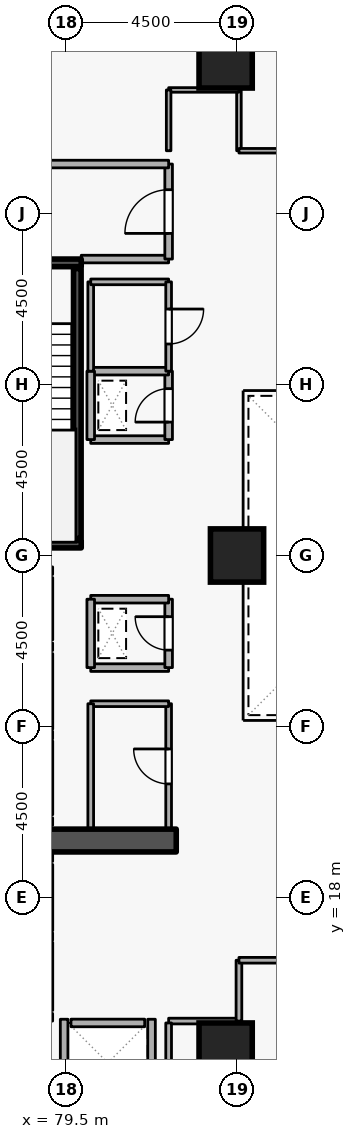
"""IFC4 building model, lengths in metres.
Left out: names, types, materials, properties, quantities, classifications, styles, units other than length and angle.
Written with IfcOpenShell. Run it as: python <this file> out.ifc"""

import sys

from ifc_helpers import new_model, si_unit, direction, frame, frame_2d, origin, origin_2d, place, context, subcontext, project, spatial, rectangle, extrude, element, fill, save


model = new_model("IFC4")
c1 = context("Model", 3, precision=1e-05, world=origin(), true_north=direction((0.0, 1.0)))
c2 = subcontext(c1, "Body", "Model", "MODEL_VIEW")
j1 = project(units=[si_unit("LENGTHUNIT", "METRE"), si_unit("PLANEANGLEUNIT", "RADIAN")], contexts=[c1])
p1 = place(None, origin())
s1 = spatial("IfcSite", under=j1, at=p1, CompositionType="ELEMENT")
p2 = place(p1, origin())
s2 = spatial("IfcBuilding", under=s1, at=p2, CompositionType="ELEMENT")
p3 = place(p2, frame((0.0, 0.0, 27.9)))
s3 = spatial("IfcBuildingStorey", under=s2, at=p3, CompositionType="ELEMENT", Elevation=27.9)
p4 = place(p3, frame((76.7, 19.5, 0.0), z_axis=(0.0, 0.0, 1.0), x_axis=(1.0, 0.0, 0.0)))
e1 = element("IfcWall", 1, at=p4, inside=s3, PredefinedType="SHEAR", context=c2, shape_type="SweptSolid", body=[
    extrude(rectangle(XDim=5.7, YDim=0.6, at=frame_2d((2.85, 0.0))), origin(), (0.0, 0.0, 1.0), 3.6),
])
for number, where, z_axis, x_axis in (
    (2, (83.7, 14.0, 0.0), (0.0, 0.0, 1.0), (1.0, 0.0, 0.0)),
    (3, (83.7, 40.0, 0.0), (0.0, 0.0, 1.0), (1.0, 0.0, 0.0)),
    (4, (84.0, 27.0, 0.0), (0.0, 0.0, 1.0), (1.0, 0.0, 0.0)),
):
    element("IfcColumn", number, at=place(p3, frame(where, z_axis=z_axis, x_axis=x_axis)), inside=s3, PredefinedType="COLUMN", context=c2, shape_type="SweptSolid", body=[
        extrude(rectangle(XDim=1.4, YDim=1.4, at=origin_2d()), origin(), (0.0, 0.0, 1.0), 3.6),
    ])
p5 = place(p3, frame((79.05, 24.78, 0.0), z_axis=(0.0, 0.0, 1.0), x_axis=(0.0, 1.0, 0.0)))
e5 = element("IfcWall", 5, at=p5, inside=s3, PredefinedType="STANDARD", context=c2, shape_type="SweptSolid", body=[
    extrude(rectangle(XDim=1.64, YDim=0.2, at=frame_2d((0.82, 0.0))), origin(), (0.0, 0.0, 1.0), 3.34),
])
p6 = place(p5, frame((0.31, 0.0, 0.0)))
e6 = element("IfcOpeningElement", 6, at=p6, cuts=e5, PredefinedType="OPENING", context=c2, shape_type="SweptSolid", body=[
    extrude(rectangle(XDim=1.02, YDim=2.06, at=frame_2d((0.51, 1.03))), frame((0.0, 0.11, 0.0), z_axis=(0.0, -1.0, 0.0), x_axis=(1.0, 0.0, 0.0)), (0.0, 0.0, 1.0), 0.22),
])
p7 = place(p3, frame((79.05, 22.43, 0.0), z_axis=(0.0, 0.0, 1.0), x_axis=(0.0, 1.0, 0.0)))
e7 = element("IfcWall", 7, at=p7, inside=s3, PredefinedType="STANDARD", context=c2, shape_type="SweptSolid", body=[
    extrude(rectangle(XDim=1.99, YDim=0.2, at=frame_2d((0.995, 0.0))), origin(), (0.0, 0.0, 1.0), 3.34),
])
p8 = place(p3, frame((79.05, 20.18, 0.0), z_axis=(0.0, 0.0, 1.0), x_axis=(0.0, 1.0, 0.0)))
e8 = element("IfcWall", 8, at=p8, inside=s3, PredefinedType="STANDARD", context=c2, shape_type="SweptSolid", body=[
    extrude(rectangle(XDim=1.94, YDim=0.2, at=frame_2d((0.97, 0.0))), origin(), (0.0, 0.0, 1.0), 3.34),
])
p9 = place(p3, frame((79.05, 17.13, 0.0), z_axis=(0.0, 0.0, 1.0), x_axis=(0.0, 1.0, 0.0)))
e9 = element("IfcWall", 9, at=p9, inside=s3, PredefinedType="STANDARD", context=c2, shape_type="SweptSolid", body=[
    extrude(rectangle(XDim=1.74, YDim=0.2, at=frame_2d((0.87, 0.0))), origin(), (0.0, 0.0, 1.0), 3.34),
])
p10 = place(p3, frame((79.05, 15.03, 0.0), z_axis=(0.0, 0.0, 1.0), x_axis=(0.0, 1.0, 0.0)))
e10 = element("IfcWall", 10, at=p10, inside=s3, PredefinedType="STANDARD", context=c2, shape_type="SweptSolid", body=[
    extrude(rectangle(XDim=1.79, YDim=0.2, at=frame_2d((0.895, 0.0))), origin(), (0.0, 0.0, 1.0), 3.34),
])
p11 = place(p3, frame((79.63, 14.7, 0.0), z_axis=(0.0, 0.0, 1.0), x_axis=(1.0, 0.0, 0.0)))
e11 = element("IfcWall", 11, at=p11, inside=s3, PredefinedType="STANDARD", context=c2, shape_type="SweptSolid", body=[
    extrude(rectangle(XDim=1.94, YDim=0.2, at=frame_2d((0.97, 0.0))), origin(), (0.0, 0.0, 1.0), 3.34),
])
for number, where, z_axis, x_axis in (
    (12, (81.75, 12.612, 0.0), (0.0, 0.0, 1.0), (0.0, 1.0, 0.0)),
    (13, (79.45, 12.612, 0.0), (0.0, 0.0, 1.0), (0.0, 1.0, 0.0)),
):
    element("IfcWall", number, at=place(p3, frame(where, z_axis=z_axis, x_axis=x_axis)), inside=s3, PredefinedType="STANDARD", context=c2, shape_type="SweptSolid", body=[
        extrude(rectangle(XDim=2.186, YDim=0.2, at=frame_2d((1.093, 0.0))), origin(), (0.0, 0.0, 1.0), 3.34),
    ])
p12 = place(p3, frame((76.55, 34.7, 0.0), z_axis=(0.0, 0.0, 1.0), x_axis=(1.0, 0.0, 0.0)))
e14 = element("IfcWall", 14, at=p12, inside=s3, PredefinedType="SHEAR", context=c2, shape_type="SweptSolid", body=[
    extrude(rectangle(XDim=3.35, YDim=0.2, at=frame_2d((1.675, 0.0))), origin(), (0.0, 0.0, 1.0), 3.6),
])
p13 = place(p12, frame((1.125, 0.0, 0.0)))
e15 = element("IfcOpeningElement", 15, at=p13, cuts=e14, PredefinedType="OPENING", context=c2, shape_type="SweptSolid", body=[
    extrude(rectangle(XDim=1.1, YDim=2.1, at=frame_2d((0.55, 1.05))), frame((0.0, 0.11, 0.0), z_axis=(0.0, -1.0, 0.0), x_axis=(1.0, 0.0, 0.0)), (0.0, 0.0, 1.0), 0.22),
])
p14 = place(p3, frame((79.9, 27.3, 0.0), z_axis=(0.0, 0.0, 1.0), x_axis=(-1.0, 0.0, 0.0)))
e16 = element("IfcWall", 16, at=p14, inside=s3, PredefinedType="SHEAR", context=c2, shape_type="SweptSolid", body=[
    extrude(rectangle(XDim=3.35, YDim=0.2, at=frame_2d((1.675, 0.0))), origin(), (0.0, 0.0, 1.0), 3.6),
])
p15 = place(p3, frame((79.797, 27.45, 0.0), z_axis=(0.0, 0.0, 1.0), x_axis=(0.0, 1.0, 0.0)))
e17 = element("IfcWall", 17, at=p15, inside=s3, PredefinedType="SHEAR", context=c2, shape_type="SweptSolid", body=[
    extrude(rectangle(XDim=7.1, YDim=0.2, at=frame_2d((3.55, 0.0))), origin(), (0.0, 0.0, 1.0), 3.6),
])
p16 = place(p3, frame((79.9, 34.8, 0.0), z_axis=(0.0, 0.0, 1.0), x_axis=(1.0, 0.0, 0.0)))
e18 = element("IfcWall", 18, at=p16, inside=s3, PredefinedType="STANDARD", context=c2, shape_type="SweptSolid", body=[
    extrude(rectangle(XDim=2.3, YDim=0.2, at=frame_2d((1.15, 0.0))), origin(), (0.0, 0.0, 1.0), 2.545),
])
p17 = place(p3, frame((82.2, 34.8, 0.0), z_axis=(0.0, 0.0, 1.0), x_axis=(0.0, 1.0, 0.0)))
e19 = element("IfcWall", 19, at=p17, inside=s3, PredefinedType="STANDARD", context=c2, shape_type="SweptSolid", body=[
    extrude(rectangle(XDim=2.5, YDim=0.2, at=frame_2d((1.25, 0.0))), origin(), (0.0, 0.0, 1.0), 3.34),
])
p18 = place(p17, frame((0.675, 0.0, 0.0)))
e20 = element("IfcOpeningElement", 20, at=p18, cuts=e19, PredefinedType="OPENING", context=c2, shape_type="SweptSolid", body=[
    extrude(rectangle(XDim=1.15, YDim=2.1, at=frame_2d((0.575, 1.05))), frame((0.0, 0.11, 0.0), z_axis=(0.0, -1.0, 0.0), x_axis=(1.0, 0.0, 0.0)), (0.0, 0.0, 1.0), 0.22),
])
p19 = place(p3, frame((82.2, 37.3, 0.0), z_axis=(0.0, 0.0, 1.0), x_axis=(-1.0, 0.0, 0.0)))
e21 = element("IfcWall", 21, at=p19, inside=s3, PredefinedType="STANDARD", context=c2, shape_type="SweptSolid", body=[
    extrude(rectangle(XDim=5.7, YDim=0.2, at=frame_2d((2.85, 0.0))), origin(), (0.0, 0.0, 1.0), 3.34),
])
p20 = place(p3, frame((80.15, 24.05, 0.0), z_axis=(0.0, 0.0, 1.0), x_axis=(1.0, 0.0, 0.0)))
e22 = element("IfcWall", 22, at=p20, inside=s3, PredefinedType="STANDARD", context=c2, shape_type="SweptSolid", body=[
    extrude(rectangle(XDim=2.05, YDim=0.2, at=frame_2d((1.025, 0.0))), origin(), (0.0, 0.0, 1.0), 3.34),
])
p21 = place(p3, frame((82.2, 24.05, 0.0), z_axis=(0.0, 0.0, 1.0), x_axis=(0.0, 1.0, 0.0)))
e23 = element("IfcWall", 23, at=p21, inside=s3, PredefinedType="STANDARD", context=c2, shape_type="SweptSolid", body=[
    extrude(rectangle(XDim=1.8, YDim=0.2, at=frame_2d((0.9, 0.0))), origin(), (0.0, 0.0, 1.0), 3.34),
])
p22 = place(p21, frame((0.46, 0.0, 0.0)))
e24 = element("IfcOpeningElement", 24, at=p22, cuts=e23, PredefinedType="OPENING", context=c2, shape_type="SweptSolid", body=[
    extrude(rectangle(XDim=0.88, YDim=2.04, at=frame_2d((0.44, 1.02))), frame((0.0, 0.11, 0.0), z_axis=(0.0, -1.0, 0.0), x_axis=(1.0, 0.0, 0.0)), (0.0, 0.0, 1.0), 0.22),
])
p23 = place(p3, frame((82.2, 25.85, 0.0), z_axis=(0.0, 0.0, 1.0), x_axis=(-1.0, 0.0, 0.0)))
e25 = element("IfcWall", 25, at=p23, inside=s3, PredefinedType="STANDARD", context=c2, shape_type="SweptSolid", body=[
    extrude(rectangle(XDim=2.05, YDim=0.2, at=frame_2d((1.025, 0.0))), origin(), (0.0, 0.0, 1.0), 3.34),
])
p24 = place(p3, frame((80.15, 25.85, 0.0), z_axis=(0.0, 0.0, 1.0), x_axis=(0.0, -1.0, 0.0)))
e26 = element("IfcWall", 26, at=p24, inside=s3, PredefinedType="STANDARD", context=c2, shape_type="SweptSolid", body=[
    extrude(rectangle(XDim=1.8, YDim=0.2, at=frame_2d((0.9, 0.0))), origin(), (0.0, 0.0, 1.0), 3.34),
])
p25 = place(p3, frame((80.15, 30.05, 0.0), z_axis=(0.0, 0.0, 1.0), x_axis=(1.0, 0.0, 0.0)))
e27 = element("IfcWall", 27, at=p25, inside=s3, PredefinedType="STANDARD", context=c2, shape_type="SweptSolid", body=[
    extrude(rectangle(XDim=2.05, YDim=0.2, at=frame_2d((1.025, 0.0))), origin(), (0.0, 0.0, 1.0), 3.34),
])
p26 = place(p3, frame((82.2, 30.05, 0.0), z_axis=(0.0, 0.0, 1.0), x_axis=(0.0, 1.0, 0.0)))
e28 = element("IfcWall", 28, at=p26, inside=s3, PredefinedType="STANDARD", context=c2, shape_type="SweptSolid", body=[
    extrude(rectangle(XDim=1.8, YDim=0.2, at=frame_2d((0.9, 0.0))), origin(), (0.0, 0.0, 1.0), 3.34),
])
p27 = place(p26, frame((0.46, 0.0, 0.0)))
e29 = element("IfcOpeningElement", 29, at=p27, cuts=e28, PredefinedType="OPENING", context=c2, shape_type="SweptSolid", body=[
    extrude(rectangle(XDim=0.88, YDim=2.04, at=frame_2d((0.44, 1.02))), frame((0.0, 0.11, 0.0), z_axis=(0.0, -1.0, 0.0), x_axis=(1.0, 0.0, 0.0)), (0.0, 0.0, 1.0), 0.22),
])
p28 = place(p3, frame((82.2, 31.85, 0.0), z_axis=(0.0, 0.0, 1.0), x_axis=(-1.0, 0.0, 0.0)))
e30 = element("IfcWall", 30, at=p28, inside=s3, PredefinedType="STANDARD", context=c2, shape_type="SweptSolid", body=[
    extrude(rectangle(XDim=2.05, YDim=0.2, at=frame_2d((1.025, 0.0))), origin(), (0.0, 0.0, 1.0), 3.34),
])
p29 = place(p3, frame((80.15, 31.85, 0.0), z_axis=(0.0, 0.0, 1.0), x_axis=(0.0, -1.0, 0.0)))
e31 = element("IfcWall", 31, at=p29, inside=s3, PredefinedType="STANDARD", context=c2, shape_type="SweptSolid", body=[
    extrude(rectangle(XDim=1.8, YDim=0.2, at=frame_2d((0.9, 0.0))), origin(), (0.0, 0.0, 1.0), 3.34),
])
p30 = place(p3, frame((82.2, 19.8, 0.0), z_axis=(0.0, 0.0, 1.0), x_axis=(0.0, 1.0, 0.0)))
e32 = element("IfcWall", 32, at=p30, inside=s3, PredefinedType="PARTITIONING", context=c2, shape_type="SweptSolid", body=[
    extrude(rectangle(XDim=3.3, YDim=0.15, at=frame_2d((1.65, 0.0))), origin(), (0.0, 0.0, 1.0), 3.34),
])
p31 = place(p30, frame((1.19, 0.0, 0.0)))
e33 = element("IfcOpeningElement", 33, at=p31, cuts=e32, PredefinedType="OPENING", context=c2, shape_type="SweptSolid", body=[
    extrude(rectangle(XDim=0.92, YDim=2.08, at=frame_2d((0.46, 1.04))), frame((0.0, 0.085, 0.0), z_axis=(0.0, -1.0, 0.0), x_axis=(1.0, 0.0, 0.0)), (0.0, 0.0, 1.0), 0.17),
])
p32 = place(p3, frame((82.2, 23.1, 0.0), z_axis=(0.0, 0.0, 1.0), x_axis=(-1.0, 0.0, 0.0)))
e34 = element("IfcWall", 34, at=p32, inside=s3, PredefinedType="PARTITIONING", context=c2, shape_type="SweptSolid", body=[
    extrude(rectangle(XDim=2.05, YDim=0.15, at=frame_2d((1.025, 0.0))), origin(), (0.0, 0.0, 1.0), 3.34),
])
p33 = place(p3, frame((80.15, 23.1, 0.0), z_axis=(0.0, 0.0, 1.0), x_axis=(0.0, -1.0, 0.0)))
e35 = element("IfcWall", 35, at=p33, inside=s3, PredefinedType="PARTITIONING", context=c2, shape_type="SweptSolid", body=[
    extrude(rectangle(XDim=3.3, YDim=0.15, at=frame_2d((1.65, 0.0))), origin(), (0.0, 0.0, 1.0), 3.34),
])
p34 = place(p3, frame((80.15, 31.85, 0.0), z_axis=(0.0, 0.0, 1.0), x_axis=(0.0, 1.0, 0.0)))
e36 = element("IfcWall", 36, at=p34, inside=s3, PredefinedType="PARTITIONING", context=c2, shape_type="SweptSolid", body=[
    extrude(rectangle(XDim=2.35, YDim=0.15, at=frame_2d((1.175, 0.0))), origin(), (0.0, 0.0, 1.0), 3.34),
])
p35 = place(p3, frame((80.15, 34.2, 0.0), z_axis=(0.0, 0.0, 1.0), x_axis=(1.0, 0.0, 0.0)))
e37 = element("IfcWall", 37, at=p35, inside=s3, PredefinedType="PARTITIONING", context=c2, shape_type="SweptSolid", body=[
    extrude(rectangle(XDim=2.05, YDim=0.15, at=frame_2d((1.025, 0.0))), origin(), (0.0, 0.0, 1.0), 2.545),
])
p36 = place(p3, frame((82.2, 34.2, 0.0), z_axis=(0.0, 0.0, 1.0), x_axis=(0.0, -1.0, 0.0)))
e38 = element("IfcWall", 38, at=p36, inside=s3, PredefinedType="PARTITIONING", context=c2, shape_type="SweptSolid", body=[
    extrude(rectangle(XDim=2.35, YDim=0.15, at=frame_2d((1.175, 0.0))), origin(), (0.0, 0.0, 1.0), 3.34),
])
p37 = place(p36, frame((0.715, 0.0, 0.0)))
e39 = element("IfcOpeningElement", 39, at=p37, cuts=e38, PredefinedType="OPENING", context=c2, shape_type="SweptSolid", body=[
    extrude(rectangle(XDim=0.92, YDim=2.08, at=frame_2d((0.46, 1.04))), frame((0.0, 0.085, 0.0), z_axis=(0.0, -1.0, 0.0), x_axis=(1.0, 0.0, 0.0)), (0.0, 0.0, 1.0), 0.17),
])
p38 = place(p3, frame((82.2, 14.75, 0.0), z_axis=(0.0, 0.0, 1.0), x_axis=(1.0, 0.0, 0.0)))
e40 = element("IfcWall", 40, at=p38, inside=s3, PredefinedType="PARTITIONING", context=c2, shape_type="SweptSolid", body=[
    extrude(rectangle(XDim=1.85, YDim=0.15, at=frame_2d((0.925, 0.0))), origin(), (0.0, 0.0, 1.0), 3.34),
])
p39 = place(p3, frame((84.05, 14.75, 0.0), z_axis=(0.0, 0.0, 1.0), x_axis=(0.0, 1.0, 0.0)))
e41 = element("IfcWall", 41, at=p39, inside=s3, PredefinedType="PARTITIONING", context=c2, shape_type="SweptSolid", body=[
    extrude(rectangle(XDim=1.6, YDim=0.15, at=frame_2d((0.8, 0.0))), origin(), (0.0, 0.0, 1.0), 3.34),
])
p40 = place(p3, frame((84.05, 16.35, 0.0), z_axis=(0.0, 0.0, 1.0), x_axis=(1.0, 0.0, 0.0)))
e42 = element("IfcWall", 42, at=p40, inside=s3, PredefinedType="PARTITIONING", context=c2, shape_type="SweptSolid", body=[
    extrude(rectangle(XDim=4.45, YDim=0.15, at=frame_2d((2.225, 0.0))), origin(), (0.0, 0.0, 1.0), 3.34),
])
p41 = place(p40, frame((1.575, 0.0, 0.0)))
e43 = element("IfcOpeningElement", 43, at=p41, cuts=e42, PredefinedType="OPENING", context=c2, shape_type="SweptSolid", body=[
    extrude(rectangle(XDim=1.3, YDim=2.12, at=frame_2d((0.65, 1.06))), frame((0.0, 0.085, 0.0), z_axis=(0.0, -1.0, 0.0), x_axis=(1.0, 0.0, 0.0)), (0.0, 0.0, 1.0), 0.17),
])
p42 = place(p3, frame((82.2, 12.4, 0.0), z_axis=(0.0, 0.0, 1.0), x_axis=(0.0, 1.0, 0.0)))
e44 = element("IfcWall", 44, at=p42, inside=s3, PredefinedType="PARTITIONING", context=c2, shape_type="SweptSolid", body=[
    extrude(rectangle(XDim=2.3, YDim=0.15, at=frame_2d((1.15, 0.0))), origin(), (0.0, 0.0, 1.0), 3.34),
])
p43 = place(p3, frame((84.05, 37.65, 0.0), z_axis=(0.0, 0.0, 1.0), x_axis=(0.0, 1.0, 0.0)))
e45 = element("IfcWall", 45, at=p43, inside=s3, PredefinedType="PARTITIONING", context=c2, shape_type="SweptSolid", body=[
    extrude(rectangle(XDim=1.6, YDim=0.12, at=frame_2d((0.8, 0.0))), origin(), (0.0, 0.0, 1.0), 3.34),
])
p44 = place(p3, frame((84.05, 39.25, 0.0), z_axis=(0.0, 0.0, 1.0), x_axis=(-1.0, 0.0, 0.0)))
e46 = element("IfcWall", 46, at=p44, inside=s3, PredefinedType="PARTITIONING", context=c2, shape_type="SweptSolid", body=[
    extrude(rectangle(XDim=1.85, YDim=0.12, at=frame_2d((0.925, 0.0))), origin(), (0.0, 0.0, 1.0), 3.34),
])
p45 = place(p3, frame((82.2, 39.25, 0.0), z_axis=(0.0, 0.0, 1.0), x_axis=(0.0, -1.0, 0.0)))
e47 = element("IfcWall", 47, at=p45, inside=s3, PredefinedType="PARTITIONING", context=c2, shape_type="SweptSolid", body=[
    extrude(rectangle(XDim=1.6, YDim=0.12, at=frame_2d((0.8, 0.0))), origin(), (0.0, 0.0, 1.0), 3.34),
])
p46 = place(p3, frame((88.5, 37.65, 0.0), z_axis=(0.0, 0.0, 1.0), x_axis=(-1.0, 0.0, 0.0)))
e48 = element("IfcWall", 48, at=p46, inside=s3, PredefinedType="PARTITIONING", context=c2, shape_type="SweptSolid", body=[
    extrude(rectangle(XDim=4.45, YDim=0.12, at=frame_2d((2.225, 0.0))), origin(), (0.0, 0.0, 1.0), 3.34),
])
p47 = place(p46, frame((1.7, 0.0, 0.0)))
e49 = element("IfcOpeningElement", 49, at=p47, cuts=e48, PredefinedType="OPENING", context=c2, shape_type="SweptSolid", body=[
    extrude(rectangle(XDim=1.05, YDim=2.1, at=frame_2d((0.525, 1.05))), frame((0.0, 0.07, 0.0), z_axis=(0.0, -1.0, 0.0), x_axis=(1.0, 0.0, 0.0)), (0.0, 0.0, 1.0), 0.14),
])
p48 = place(p18, origin())
e50 = element("IfcDoor", 50, at=p48, inside=s3, OperationType="SINGLE_SWING_LEFT", PredefinedType="DOOR", context=c2, shape_type="SweptSolid", body=[
    extrude(rectangle(XDim=1.15, YDim=2.1, at=frame_2d((0.575, 1.05))), frame((0.0, 0.025, 0.0), z_axis=(0.0, -1.0, 0.0), x_axis=(1.0, 0.0, 0.0)), (0.0, 0.0, 1.0), 0.05),
])
fill(e20, e50)
p49 = place(p22, origin())
e51 = element("IfcDoor", 51, at=p49, inside=s3, OperationType="SINGLE_SWING_RIGHT", PredefinedType="DOOR", context=c2, shape_type="SweptSolid", body=[
    extrude(rectangle(XDim=0.88, YDim=2.04, at=frame_2d((0.44, 1.02))), frame((0.0, 0.025, 0.0), z_axis=(0.0, -1.0, 0.0), x_axis=(1.0, 0.0, 0.0)), (0.0, 0.0, 1.0), 0.05),
])
fill(e24, e51)
p50 = place(p27, origin())
e52 = element("IfcDoor", 52, at=p50, inside=s3, OperationType="SINGLE_SWING_LEFT", PredefinedType="DOOR", context=c2, shape_type="SweptSolid", body=[
    extrude(rectangle(XDim=0.88, YDim=2.04, at=frame_2d((0.44, 1.02))), frame((0.0, 0.025, 0.0), z_axis=(0.0, -1.0, 0.0), x_axis=(1.0, 0.0, 0.0)), (0.0, 0.0, 1.0), 0.05),
])
fill(e29, e52)
p51 = place(p31, origin())
e53 = element("IfcDoor", 53, at=p51, inside=s3, OperationType="SINGLE_SWING_RIGHT", PredefinedType="DOOR", context=c2, shape_type="SweptSolid", body=[
    extrude(rectangle(XDim=0.92, YDim=2.08, at=frame_2d((0.46, 1.04))), frame((0.0, 0.025, 0.0), z_axis=(0.0, -1.0, 0.0), x_axis=(1.0, 0.0, 0.0)), (0.0, 0.0, 1.0), 0.05),
])
fill(e33, e53)
p52 = place(p37, origin())
e54 = element("IfcDoor", 54, at=p52, inside=s3, OperationType="SINGLE_SWING_LEFT", PredefinedType="DOOR", context=c2, shape_type="SweptSolid", body=[
    extrude(rectangle(XDim=0.92, YDim=2.08, at=frame_2d((0.46, 1.04))), frame((0.0, 0.025, 0.0), z_axis=(0.0, -1.0, 0.0), x_axis=(1.0, 0.0, 0.0)), (0.0, 0.0, 1.0), 0.05),
])
fill(e39, e54)
save(model, sys.argv[1])
